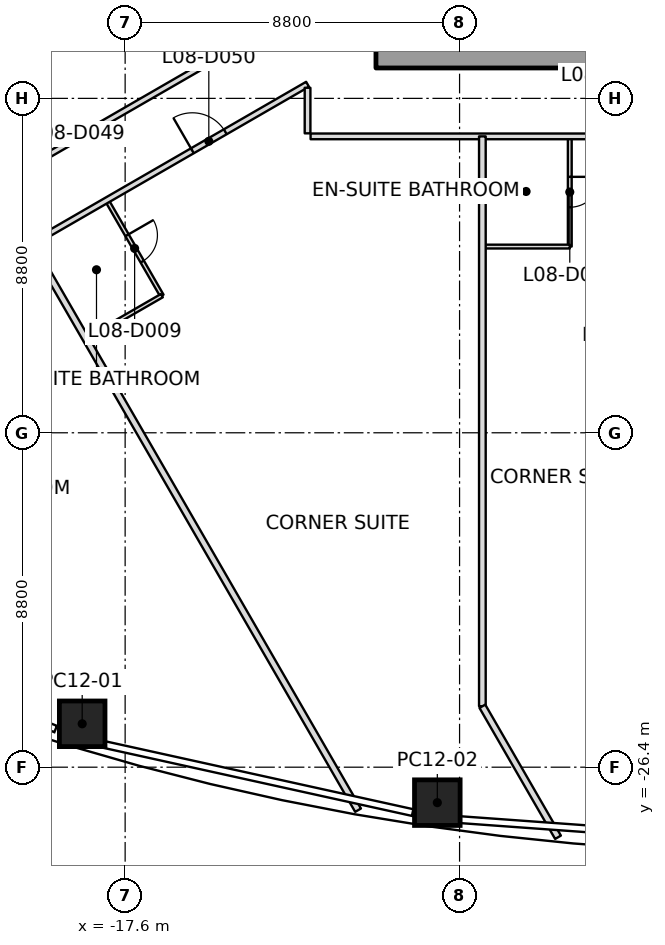
"""IFC4 building model, lengths in metres.
Left out: names, types, materials, properties, quantities, classifications, styles, units other than length and angle.
Written with IfcOpenShell. Run it as: python <this file> out.ifc"""

import sys

from ifc_helpers import new_model, si_unit, direction, frame, frame_2d, origin, origin_2d, place, context, subcontext, project, spatial, rectangle, extrude, clip, halfspace, element, fill, save


model = new_model("IFC4")
c1 = context("Model", 3, precision=1e-05, world=origin(), true_north=direction((0.0, 1.0)))
c2 = subcontext(c1, "Body", "Model", "MODEL_VIEW")
j1 = project(units=[si_unit("LENGTHUNIT", "METRE"), si_unit("PLANEANGLEUNIT", "RADIAN")], contexts=[c1])
p1 = place(None, origin())
s1 = spatial("IfcSite", under=j1, at=p1, CompositionType="ELEMENT")
p2 = place(p1, origin())
s2 = spatial("IfcBuilding", under=s1, at=p2, CompositionType="ELEMENT")
p3 = place(p2, frame((0.0, 0.0, 51.7)))
s3 = spatial("IfcBuildingStorey", under=s2, at=p3, CompositionType="ELEMENT", Elevation=51.7)
p4 = place(p3, frame((-18.73, -25.258, 0.0), z_axis=(0.018960260892, 0.176875858454, 0.984050526753), x_axis=(-0.957447491583, 0.286704825548, -0.033085402656)))
e1 = element("IfcColumn", 1, at=p4, inside=s3, PredefinedType="COLUMN", context=c2, shape_type="SweptSolid", body=[
    clip(clip(extrude(rectangle(XDim=1.2, YDim=1.2, at=origin_2d()), origin(), (0.0, 0.0, 1.0), 3.76), halfspace(frame((0.0, 0.0, 0.001)), True)), halfspace(frame((0.0, 0.0, 3.759)), False)),
])
p5 = place(p3, frame((-9.385, -27.333, 0.0), z_axis=(0.009452762663, 0.224036905553, 0.974534817351), x_axis=(0.982720582571, -0.182243855241, 0.032364082218)))
e2 = element("IfcColumn", 2, at=p5, inside=s3, PredefinedType="COLUMN", context=c2, shape_type="SweptSolid", body=[
    extrude(rectangle(XDim=1.2, YDim=1.2, at=origin_2d()), origin(), (0.0, 0.0, 1.0), 3.797),
])
p6 = place(p3, frame((-11.0, -7.75, 0.0), z_axis=(0.0, 0.0, 1.0), x_axis=(1.0, 0.0, 0.0)))
e3 = element("IfcWall", 3, at=p6, inside=s3, PredefinedType="SHEAR", context=c2, shape_type="SweptSolid", body=[
    extrude(rectangle(XDim=22.0, YDim=0.5, at=frame_2d((11.0, 0.0))), origin(), (0.0, 0.0, 1.0), 3.7),
])
p7 = place(p6, frame((10.45, 0.0, 0.0)))
e4 = element("IfcOpeningElement", 4, at=p7, cuts=e3, PredefinedType="OPENING", context=c2, shape_type="SweptSolid", body=[
    extrude(rectangle(XDim=1.1, YDim=2.1, at=frame_2d((0.55, 1.05))), frame((0.0, 0.25, 0.0), z_axis=(0.0, -1.0, 0.0), x_axis=(1.0, 0.0, 0.0)), (0.0, 0.0, 1.0), 0.5),
])
p8 = place(p3, frame((-20.075, -12.629, 0.0), z_axis=(0.0, 0.0, 1.0), x_axis=(0.500011885049, -0.866018541839, 0.0)))
e5 = element("IfcWall", 5, at=p8, inside=s3, PredefinedType="PARTITIONING", context=c2, shape_type="SweptSolid", body=[
    extrude(rectangle(XDim=17.208, YDim=0.175, at=frame_2d((8.604, 0.0))), origin(), (0.0, 0.0, 1.0), 2.934),
])
p9 = place(p3, frame((-8.2, -9.8, 0.0), z_axis=(0.0, 0.0, 1.0), x_axis=(0.0, -1.0, 0.0)))
e6 = element("IfcWall", 6, at=p9, inside=s3, PredefinedType="PARTITIONING", context=c2, shape_type="SweptSolid", body=[
    extrude(rectangle(XDim=14.997, YDim=0.175, at=frame_2d((7.498, 0.0))), origin(), (0.0, 0.0, 1.0), 3.15),
])
p10 = place(p3, frame((-8.2, -24.797, 0.0), z_axis=(0.0, 0.0, 1.0), x_axis=(0.499984338927, -0.86603444552, 0.0)))
e7 = element("IfcWall", 7, at=p10, inside=s3, PredefinedType="PARTITIONING", context=c2, shape_type="SweptSolid", body=[
    extrude(rectangle(XDim=3.981, YDim=0.175, at=frame_2d((1.991, 0.0))), origin(), (0.0, 0.0, 1.0), 2.934),
])
p11 = place(p3, frame((-12.8, -6.351, 0.0), z_axis=(0.0, 0.0, 1.0), x_axis=(-0.866025574339, -0.499999704591, 0.0)))
e8 = element("IfcWall", 8, at=p11, inside=s3, PredefinedType="PARTITIONING", context=c2, shape_type="SweptSolid", body=[
    extrude(rectangle(XDim=13.365, YDim=0.15, at=frame_2d((6.682, 0.0))), origin(), (0.0, 0.0, 1.0), 2.947),
])
p12 = place(p11, frame((11.965, 0.0, 0.0)))
e9 = element("IfcOpeningElement", 9, at=p12, cuts=e8, PredefinedType="OPENING", context=c2, shape_type="SweptSolid", body=[
    extrude(rectangle(XDim=1.0, YDim=2.1, at=frame_2d((0.5, 1.05))), frame((0.0, 0.075, 0.0), z_axis=(0.0, -1.0, 0.0), x_axis=(1.0, 0.0, 0.0)), (0.0, 0.0, 1.0), 0.15),
])
p13 = place(p3, frame((-23.474, -14.592, 0.0), z_axis=(0.0, 0.0, 1.0), x_axis=(0.866019666699, 0.500009936792, 0.0)))
e10 = element("IfcWall", 10, at=p13, inside=s3, PredefinedType="PARTITIONING", context=c2, shape_type="SweptSolid", body=[
    extrude(rectangle(XDim=12.325, YDim=0.15, at=frame_2d((6.163, 0.0))), origin(), (0.0, 0.0, 1.0), 2.797),
])
p14 = place(p13, frame((2.653, 0.0, 0.0)))
e11 = element("IfcOpeningElement", 11, at=p14, cuts=e10, PredefinedType="OPENING", context=c2, shape_type="SweptSolid", body=[
    extrude(rectangle(XDim=1.0, YDim=2.1, at=frame_2d((0.5, 1.05))), frame((0.0, 0.075, 0.0), z_axis=(0.0, -1.0, 0.0), x_axis=(1.0, 0.0, 0.0)), (0.0, 0.0, 1.0), 0.15),
])
p15 = place(p13, frame((8.825, 0.0, 0.0)))
e12 = element("IfcOpeningElement", 12, at=p15, cuts=e10, PredefinedType="OPENING", context=c2, shape_type="SweptSolid", body=[
    extrude(rectangle(XDim=1.0, YDim=2.1, at=frame_2d((0.5, 1.05))), frame((0.0, 0.075, 0.0), z_axis=(0.0, -1.0, 0.0), x_axis=(1.0, 0.0, 0.0)), (0.0, 0.0, 1.0), 0.15),
])
p16 = place(p3, frame((-12.8, -8.521, 0.0), z_axis=(0.0, 0.0, 1.0), x_axis=(0.0, -1.0, 0.0)))
e13 = element("IfcWall", 13, at=p16, inside=s3, PredefinedType="PARTITIONING", context=c2, shape_type="SweptSolid", body=[
    extrude(rectangle(XDim=1.199, YDim=0.15, at=frame_2d((0.6, 0.0))), origin(), (0.0, 0.0, 1.0), 2.797),
])
p17 = place(p3, frame((-12.72, -9.8, 0.0), z_axis=(0.0, 0.0, 1.0), x_axis=(1.0, 0.0, 0.0)))
e14 = element("IfcWall", 14, at=p17, inside=s3, PredefinedType="PARTITIONING", context=c2, shape_type="SweptSolid", body=[
    extrude(rectangle(XDim=25.44, YDim=0.15, at=frame_2d((12.72, 0.0))), origin(), (0.0, 0.0, 1.0), 2.947),
])
p18 = place(p17, frame((7.32, 0.0, 0.0)))
e15 = element("IfcOpeningElement", 15, at=p18, cuts=e14, PredefinedType="OPENING", context=c2, shape_type="SweptSolid", body=[
    extrude(rectangle(XDim=1.0, YDim=2.1, at=frame_2d((0.5, 1.05))), frame((0.0, 0.075, 0.0), z_axis=(0.0, -1.0, 0.0), x_axis=(1.0, 0.0, 0.0)), (0.0, 0.0, 1.0), 0.15),
])
p19 = place(p17, frame((11.52, 0.0, 0.0)))
e16 = element("IfcOpeningElement", 16, at=p19, cuts=e14, PredefinedType="OPENING", context=c2, shape_type="SweptSolid", body=[
    extrude(rectangle(XDim=1.0, YDim=2.1, at=frame_2d((0.5, 1.05))), frame((0.0, 0.075, 0.0), z_axis=(0.0, -1.0, 0.0), x_axis=(1.0, 0.0, 0.0)), (0.0, 0.0, 1.0), 0.15),
])
p20 = place(p17, frame((15.72, 0.0, 0.0)))
e17 = element("IfcOpeningElement", 17, at=p20, cuts=e14, PredefinedType="OPENING", context=c2, shape_type="SweptSolid", body=[
    extrude(rectangle(XDim=1.0, YDim=2.1, at=frame_2d((0.5, 1.05))), frame((0.0, 0.075, 0.0), z_axis=(0.0, -1.0, 0.0), x_axis=(1.0, 0.0, 0.0)), (0.0, 0.0, 1.0), 0.15),
])
p21 = place(p17, frame((19.92, 0.0, 0.0)))
e18 = element("IfcOpeningElement", 18, at=p21, cuts=e14, PredefinedType="OPENING", context=c2, shape_type="SweptSolid", body=[
    extrude(rectangle(XDim=1.0, YDim=2.1, at=frame_2d((0.5, 1.05))), frame((0.0, 0.075, 0.0), z_axis=(0.0, -1.0, 0.0), x_axis=(1.0, 0.0, 0.0)), (0.0, 0.0, 1.0), 0.15),
])
p22 = place(p3, frame((-18.068, -11.505, 0.0), z_axis=(0.0, 0.0, 1.0), x_axis=(0.500036638401, -0.866004249561, 0.0)))
e19 = element("IfcWall", 19, at=p22, inside=s3, PredefinedType="PARTITIONING", context=c2, shape_type="SweptSolid", body=[
    extrude(rectangle(XDim=2.87, YDim=0.1, at=frame_2d((1.435, 0.0))), origin(), (0.0, 0.0, 1.0), 2.797),
])
p23 = place(p22, frame((1.035, 0.0, 0.0)))
e20 = element("IfcOpeningElement", 20, at=p23, cuts=e19, PredefinedType="OPENING", context=c2, shape_type="SweptSolid", body=[
    extrude(rectangle(XDim=0.8, YDim=2.1, at=frame_2d((0.4, 1.05))), frame((0.0, 0.05, 0.0), z_axis=(0.0, -1.0, 0.0), x_axis=(1.0, 0.0, 0.0)), (0.0, 0.0, 1.0), 0.1),
])
p24 = place(p3, frame((-16.633, -13.991, 0.0), z_axis=(0.0, 0.0, 1.0), x_axis=(-0.866017224141, -0.500014167291, 0.0)))
e21 = element("IfcWall", 21, at=p24, inside=s3, PredefinedType="PARTITIONING", context=c2, shape_type="SweptSolid", body=[
    extrude(rectangle(XDim=2.27, YDim=0.1, at=frame_2d((1.135, 0.0))), origin(), (0.0, 0.0, 1.0), 3.15),
])
p25 = place(p3, frame((-5.9, -9.83, 0.0), z_axis=(0.0, 0.0, 1.0), x_axis=(0.0, -1.0, 0.0)))
e22 = element("IfcWall", 22, at=p25, inside=s3, PredefinedType="PARTITIONING", context=c2, shape_type="SweptSolid", body=[
    extrude(rectangle(XDim=2.87, YDim=0.1, at=frame_2d((1.435, 0.0))), origin(), (0.0, 0.0, 1.0), 3.15),
])
p26 = place(p25, frame((1.035, 0.0, 0.0)))
e23 = element("IfcOpeningElement", 23, at=p26, cuts=e22, PredefinedType="OPENING", context=c2, shape_type="SweptSolid", body=[
    extrude(rectangle(XDim=0.8, YDim=2.1, at=frame_2d((0.4, 1.05))), frame((0.0, 0.05, 0.0), z_axis=(0.0, -1.0, 0.0), x_axis=(1.0, 0.0, 0.0)), (0.0, 0.0, 1.0), 0.1),
])
p27 = place(p3, frame((-5.9, -12.7, 0.0), z_axis=(0.0, 0.0, 1.0), x_axis=(-1.0, 0.0, 0.0)))
e24 = element("IfcWall", 24, at=p27, inside=s3, PredefinedType="PARTITIONING", context=c2, shape_type="SweptSolid", body=[
    extrude(rectangle(XDim=2.27, YDim=0.1, at=frame_2d((1.135, 0.0))), origin(), (0.0, 0.0, 1.0), 2.947),
])
p28 = place(p15, origin())
e25 = element("IfcDoor", 25, at=p28, inside=s3, OperationType="SINGLE_SWING_RIGHT", PredefinedType="DOOR", context=c2, shape_type="SweptSolid", body=[
    extrude(rectangle(XDim=1.0, YDim=2.1, at=frame_2d((0.5, 1.05))), frame((0.0, 0.025, 0.0), z_axis=(0.0, -1.0, 0.0), x_axis=(1.0, 0.0, 0.0)), (0.0, 0.0, 1.0), 0.05),
])
fill(e12, e25)
p29 = place(p23, origin())
e26 = element("IfcDoor", 26, at=p29, inside=s3, OperationType="SINGLE_SWING_RIGHT", PredefinedType="DOOR", context=c2, shape_type="SweptSolid", body=[
    extrude(rectangle(XDim=0.8, YDim=2.1, at=frame_2d((0.4, 1.05))), frame((0.0, 0.025, 0.0), z_axis=(0.0, -1.0, 0.0), x_axis=(1.0, 0.0, 0.0)), (0.0, 0.0, 1.0), 0.05),
])
fill(e20, e26)
p30 = place(p26, origin())
e27 = element("IfcDoor", 27, at=p30, inside=s3, OperationType="SINGLE_SWING_LEFT", PredefinedType="DOOR", context=c2, shape_type="SweptSolid", body=[
    extrude(rectangle(XDim=0.8, YDim=2.1, at=frame_2d((0.4, 1.05))), frame((0.0, 0.025, 0.0), z_axis=(0.0, -1.0, 0.0), x_axis=(1.0, 0.0, 0.0)), (0.0, 0.0, 1.0), 0.05),
])
fill(e23, e27)
save(model, sys.argv[1])
